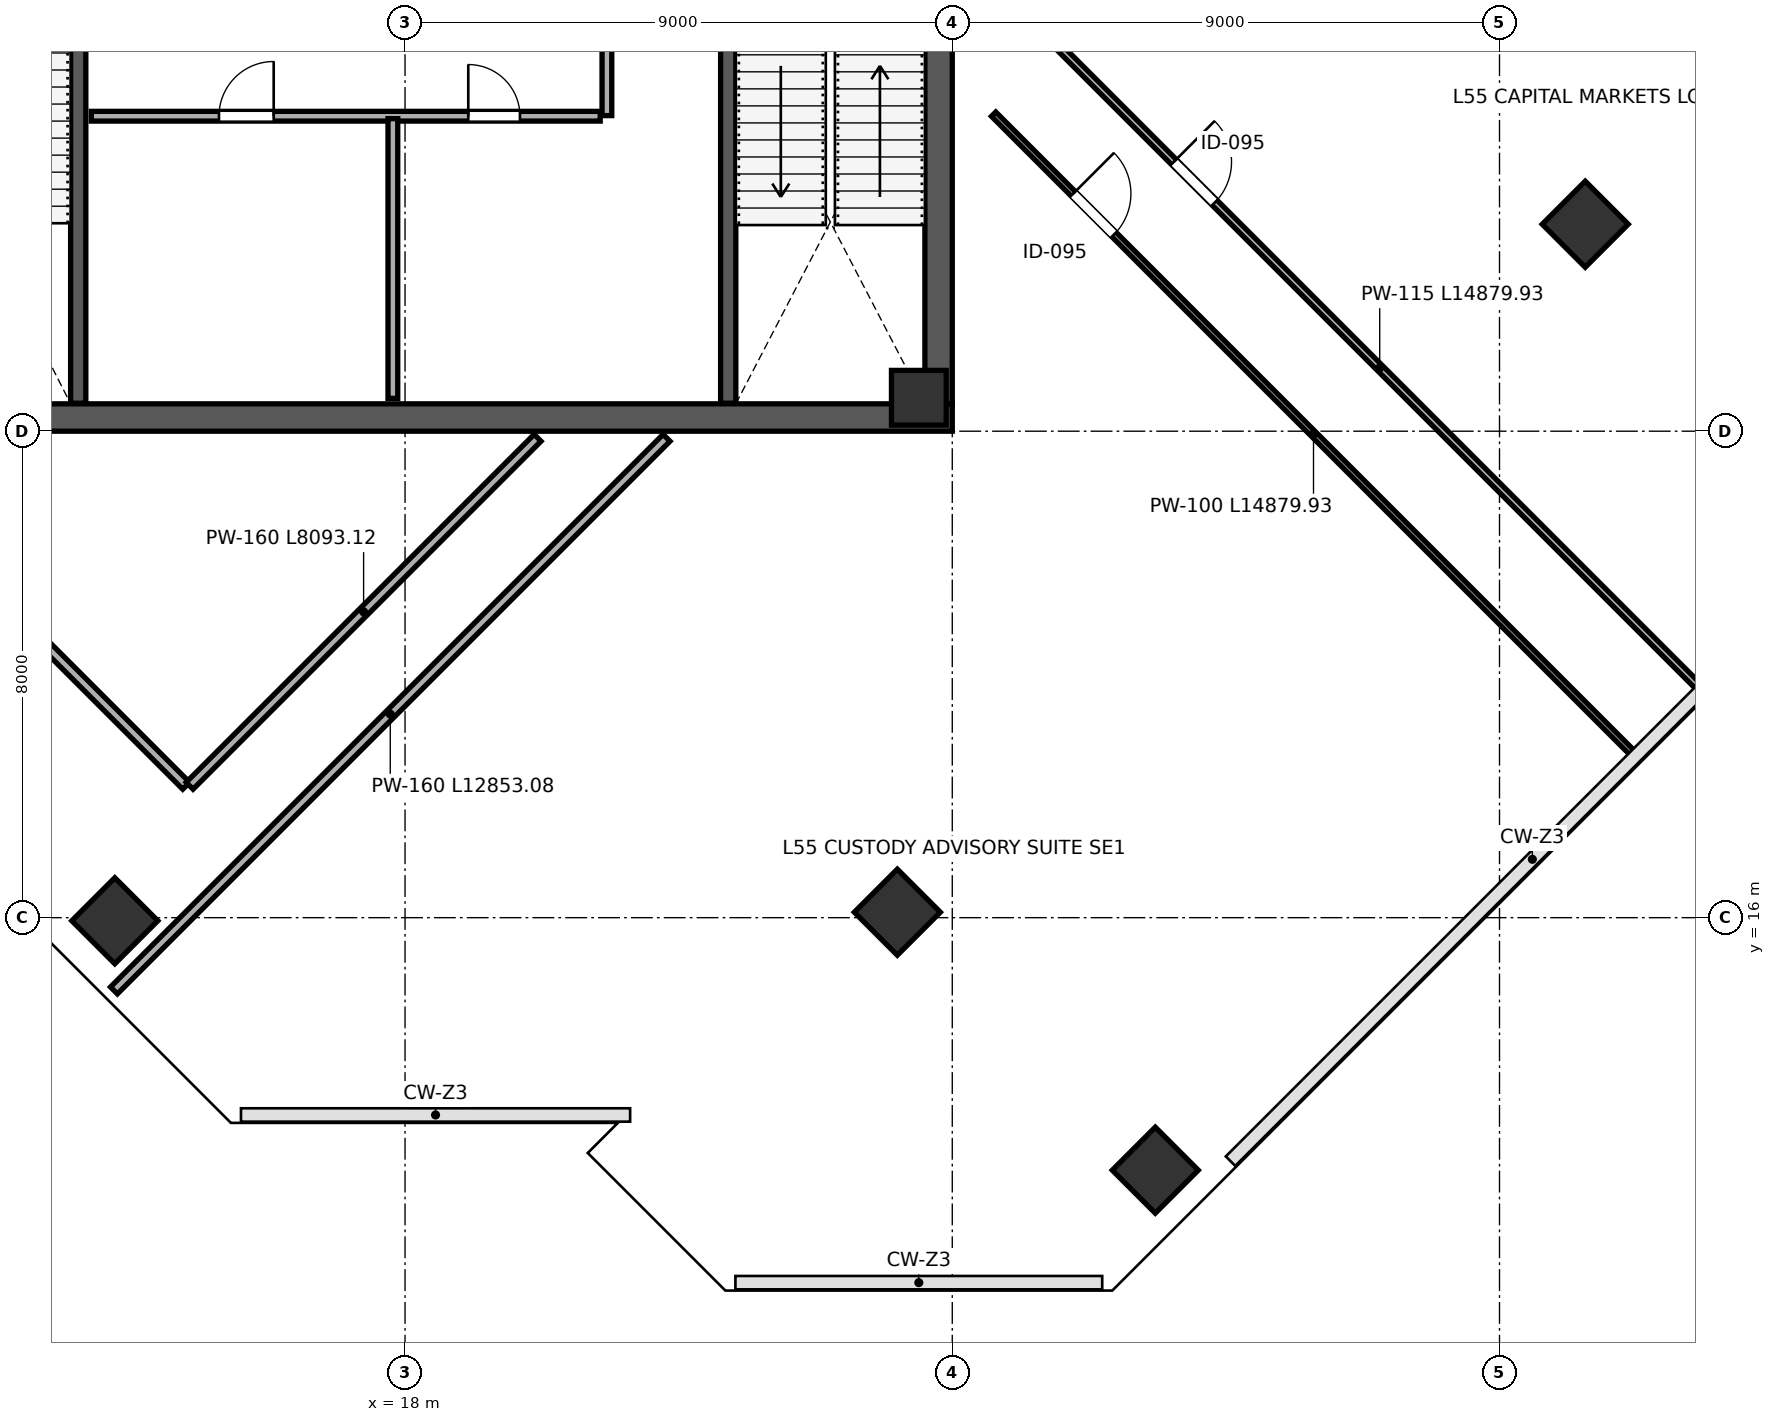
"""IFC4 building model, lengths in metres.
Left out: names, types, materials, properties, quantities, classifications, styles, units other than length and angle.
Written with IfcOpenShell. Run it as: python <this file> out.ifc"""

import sys

from ifc_helpers import new_model, si_unit, direction, frame, frame_2d, origin, origin_2d, place, context, subcontext, project, spatial, rectangle, extrude, source, transform, mapped, element, fill, save


model = new_model("IFC4")
c1 = context("Model", 3, precision=1e-05, world=origin(), true_north=direction((0.0, 1.0)))
c2 = subcontext(c1, "Body", "Model", "MODEL_VIEW")
j1 = project(units=[si_unit("LENGTHUNIT", "METRE"), si_unit("PLANEANGLEUNIT", "RADIAN")], contexts=[c1])
p1 = place(None, origin())
s1 = spatial("IfcSite", under=j1, at=p1, CompositionType="ELEMENT")
p2 = place(p1, origin())
s2 = spatial("IfcBuilding", under=s1, at=p2, CompositionType="ELEMENT")
p3 = place(p2, frame((0.0, 0.0, 245.8)))
s3 = spatial("IfcBuildingStorey", under=s2, at=p3, CompositionType="ELEMENT", Elevation=245.8)
m1 = source(origin(), c2, "Body", "SweptSolid", [
    extrude(rectangle(XDim=0.9, YDim=0.9, at=origin_2d()), origin(), (0.0, 0.0, 1.0), 4.198),
])
p4 = place(p3, frame((26.45, 24.55, 0.001), z_axis=(0.0, 0.0, 1.0), x_axis=(1.0, 0.0, 0.0)))
e1 = element("IfcColumn", 1, at=p4, inside=s3, PredefinedType="COLUMN", context=c2, shape_type="MappedRepresentation", body=[
    mapped(m1, transform((0.0, 0.0, 0.0), scale=1.0)),
])
m2 = source(origin(), c2, "Body", "SweptSolid", [
    extrude(rectangle(XDim=1.0, YDim=1.0, at=origin_2d()), origin(), (0.0, 0.0, 1.0), 4.198),
])
p5 = place(p3, frame((13.227, 15.949, 0.001), z_axis=(0.0, 0.0, 1.0), x_axis=(-0.707106781187, 0.707106781187, 0.0)))
e2 = element("IfcColumn", 2, at=p5, inside=s3, PredefinedType="COLUMN", context=c2, shape_type="MappedRepresentation", body=[
    mapped(m2, transform((0.0, 0.0, 0.0), scale=1.0)),
])
m3 = source(origin(), c2, "Body", "SweptSolid", [
    extrude(rectangle(XDim=1.0, YDim=1.0, at=origin_2d()), origin(), (0.0, 0.0, 1.0), 4.198),
])
for number, where, z_axis, x_axis in (
    (3, (26.096, 16.09, 0.001), (0.0, 0.0, 1.0), (-0.707, 0.707, 0.0)),
    (4, (37.41, 27.404, 0.001), (0.0, 0.0, 1.0), (-0.707, 0.707, 0.0)),
):
    element("IfcColumn", number, at=place(p3, frame(where, z_axis=z_axis, x_axis=x_axis)), inside=s3, PredefinedType="COLUMN", context=c2, shape_type="MappedRepresentation", body=[
        mapped(m3, transform((0.0, 0.0, 0.0), scale=1.0)),
    ])
p6 = place(p3, frame((30.339, 11.847, 0.001), z_axis=(0.0, 0.0, 1.0), x_axis=(-0.707106781187, 0.707106781187, 0.0)))
e5 = element("IfcColumn", 5, at=p6, inside=s3, PredefinedType="COLUMN", context=c2, shape_type="MappedRepresentation", body=[
    mapped(m2, transform((0.0, 0.0, 0.0), scale=1.0)),
])
p7 = place(p3, frame((26.775, 24.45, 0.0), z_axis=(0.0, 0.0, 1.0), x_axis=(0.0, 1.0, 0.0)))
e6 = element("IfcWall", 6, at=p7, inside=s3, PredefinedType="SHEAR", context=c2, shape_type="SweptSolid", body=[
    extrude(rectangle(XDim=15.1, YDim=0.45, at=frame_2d((7.55, 0.0))), origin(), (0.0, 0.0, 1.0), 3.96),
])
p8 = place(p7, frame((8.6, 0.0, 0.0)))
e7 = element("IfcOpeningElement", 7, at=p8, cuts=e6, PredefinedType="OPENING", context=c2, shape_type="SweptSolid", body=[
    extrude(rectangle(XDim=1.15, YDim=2.2, at=frame_2d((0.575, 1.1))), frame((0.0, 0.235, 0.0), z_axis=(0.0, -1.0, 0.0), x_axis=(1.0, 0.0, 0.0)), (0.0, 0.0, 1.0), 0.47),
])
p9 = place(p3, frame((9.0, 24.225, 0.0), z_axis=(0.0, 0.0, 1.0), x_axis=(1.0, 0.0, 0.0)))
e8 = element("IfcWall", 8, at=p9, inside=s3, PredefinedType="SHEAR", context=c2, shape_type="SweptSolid", body=[
    extrude(rectangle(XDim=18.0, YDim=0.45, at=frame_2d((9.0, 0.0))), origin(), (0.0, 0.0, 1.0), 3.96),
])
p10 = place(p3, frame((12.625, 24.46, 0.0), z_axis=(0.0, 0.0, 1.0), x_axis=(0.0, 1.0, 0.0)))
e9 = element("IfcWall", 9, at=p10, inside=s3, PredefinedType="SHEAR", context=c2, shape_type="SweptSolid", body=[
    extrude(rectangle(XDim=7.49, YDim=0.25, at=frame_2d((3.745, 0.0))), origin(), (0.0, 0.0, 1.0), 3.96),
])
p11 = place(p10, frame((5.85, 0.0, 0.0)))
e10 = element("IfcOpeningElement", 10, at=p11, cuts=e9, PredefinedType="OPENING", context=c2, shape_type="SweptSolid", body=[
    extrude(rectangle(XDim=1.15, YDim=2.2, at=frame_2d((0.575, 1.1))), frame((0.0, 0.135, 0.0), z_axis=(0.0, -1.0, 0.0), x_axis=(1.0, 0.0, 0.0)), (0.0, 0.0, 1.0), 0.27),
])
p12 = place(p3, frame((23.315, 24.46, 0.0), z_axis=(0.0, 0.0, 1.0), x_axis=(0.0, 1.0, 0.0)))
e11 = element("IfcWall", 11, at=p12, inside=s3, PredefinedType="SHEAR", context=c2, shape_type="SweptSolid", body=[
    extrude(rectangle(XDim=7.49, YDim=0.25, at=frame_2d((3.745, 0.0))), origin(), (0.0, 0.0, 1.0), 3.96),
])
p13 = place(p3, frame((12.84, 29.18, 0.0), z_axis=(0.0, 0.0, 1.0), x_axis=(1.0, 0.0, 0.0)))
e12 = element("IfcWall", 12, at=p13, inside=s3, PredefinedType="PARTITIONING", context=c2, shape_type="SweptSolid", body=[
    extrude(rectangle(XDim=8.37, YDim=0.16, at=frame_2d((4.185, 0.0))), origin(), (0.0, 0.0, 1.0), 3.96),
])
p14 = place(p13, frame((2.1, 0.0, 0.0)))
e13 = element("IfcOpeningElement", 13, at=p14, cuts=e12, PredefinedType="OPENING", context=c2, shape_type="SweptSolid", body=[
    extrude(rectangle(XDim=0.9, YDim=2.15, at=frame_2d((0.45, 1.075))), frame((0.0, 0.09, 0.0), z_axis=(0.0, -1.0, 0.0), x_axis=(1.0, 0.0, 0.0)), (0.0, 0.0, 1.0), 0.18),
])
p15 = place(p13, frame((6.2, 0.0, 0.0)))
e14 = element("IfcOpeningElement", 14, at=p15, cuts=e12, PredefinedType="OPENING", context=c2, shape_type="SweptSolid", body=[
    extrude(rectangle(XDim=0.85, YDim=2.1, at=frame_2d((0.425, 1.05))), frame((0.0, 0.09, 0.0), z_axis=(0.0, -1.0, 0.0), x_axis=(1.0, 0.0, 0.0)), (0.0, 0.0, 1.0), 0.18),
])
p16 = place(p3, frame((17.8, 24.54, 0.0), z_axis=(0.0, 0.0, 1.0), x_axis=(0.0, 1.0, 0.0)))
e15 = element("IfcWall", 15, at=p16, inside=s3, PredefinedType="PARTITIONING", context=c2, shape_type="SweptSolid", body=[
    extrude(rectangle(XDim=4.6, YDim=0.16, at=frame_2d((2.3, 0.0))), origin(), (0.0, 0.0, 1.0), 3.96),
])
p17 = place(p3, frame((21.32, 29.19, 0.0), z_axis=(0.0, 0.0, 1.0), x_axis=(0.0, 1.0, 0.0)))
e16 = element("IfcWall", 16, at=p17, inside=s3, PredefinedType="PARTITIONING", context=c2, shape_type="SweptSolid", body=[
    extrude(rectangle(XDim=2.92, YDim=0.16, at=frame_2d((1.46, 0.0))), origin(), (0.0, 0.0, 1.0), 3.96),
])
p18 = place(p3, frame((4.452, 28.118, 0.0), z_axis=(0.0, 0.0, 1.0), x_axis=(0.707106781187, -0.707106781187, 0.0)))
e17 = element("IfcWall", 17, at=p18, inside=s3, PredefinedType="PARTITIONING", context=c2, shape_type="SweptSolid", body=[
    extrude(rectangle(XDim=14.07, YDim=0.16, at=frame_2d((7.035, 0.0))), origin(), (0.0, 0.0, 1.0), 3.96),
])
p19 = place(p18, frame((1.15, 0.0, 0.0)))
e18 = element("IfcOpeningElement", 18, at=p19, cuts=e17, PredefinedType="OPENING", context=c2, shape_type="SweptSolid", body=[
    extrude(rectangle(XDim=0.95, YDim=2.15, at=frame_2d((0.475, 1.075))), frame((0.0, 0.09, 0.0), z_axis=(0.0, -1.0, 0.0), x_axis=(1.0, 0.0, 0.0)), (0.0, 0.0, 1.0), 0.18),
])
p20 = place(p3, frame((14.457, 18.169, 0.0), z_axis=(0.0, 0.0, 1.0), x_axis=(0.707106781187, 0.707106781187, 0.0)))
e19 = element("IfcWall", 19, at=p20, inside=s3, PredefinedType="PARTITIONING", context=c2, shape_type="SweptSolid", body=[
    extrude(rectangle(XDim=8.093, YDim=0.16, at=frame_2d((4.046, 0.0))), origin(), (0.0, 0.0, 1.0), 3.96),
])
p21 = place(p3, frame((13.213, 14.803, 0.0), z_axis=(0.0, 0.0, 1.0), x_axis=(0.707116278481, 0.707097283765, 0.0)))
e20 = element("IfcWall", 20, at=p21, inside=s3, PredefinedType="PARTITIONING", context=c2, shape_type="SweptSolid", body=[
    extrude(rectangle(XDim=12.853, YDim=0.16, at=frame_2d((6.427, 0.0))), origin(), (0.0, 0.0, 1.0), 3.96),
])
p22 = place(p3, frame((28.769, 30.303, 0.0), z_axis=(0.0, 0.0, 1.0), x_axis=(0.707106781187, -0.707106781187, 0.0)))
e21 = element("IfcWall", 21, at=p22, inside=s3, PredefinedType="PARTITIONING", context=c2, shape_type="SweptSolid", body=[
    extrude(rectangle(XDim=14.88, YDim=0.115, at=frame_2d((7.44, 0.0))), origin(), (0.0, 0.0, 1.0), 3.96),
])
p23 = place(p22, frame((2.65, 0.0, 0.0)))
e22 = element("IfcOpeningElement", 22, at=p23, cuts=e21, PredefinedType="OPENING", context=c2, shape_type="SweptSolid", body=[
    extrude(rectangle(XDim=0.95, YDim=2.15, at=frame_2d((0.475, 1.075))), frame((0.0, 0.067, 0.0), z_axis=(0.0, -1.0, 0.0), x_axis=(1.0, 0.0, 0.0)), (0.0, 0.0, 1.0), 0.135),
])
p24 = place(p3, frame((27.68, 29.214, 0.0), z_axis=(0.0, 0.0, 1.0), x_axis=(0.707106781187, -0.707106781187, 0.0)))
e23 = element("IfcWall", 23, at=p24, inside=s3, PredefinedType="PARTITIONING", context=c2, shape_type="SweptSolid", body=[
    extrude(rectangle(XDim=14.88, YDim=0.1, at=frame_2d((7.44, 0.0))), origin(), (0.0, 0.0, 1.0), 3.96),
])
p25 = place(p24, frame((1.85, 0.0, 0.0)))
e24 = element("IfcOpeningElement", 24, at=p25, cuts=e23, PredefinedType="OPENING", context=c2, shape_type="SweptSolid", body=[
    extrude(rectangle(XDim=0.95, YDim=2.15, at=frame_2d((0.475, 1.075))), frame((0.0, 0.06, 0.0), z_axis=(0.0, -1.0, 0.0), x_axis=(1.0, 0.0, 0.0)), (0.0, 0.0, 1.0), 0.12),
])
m4 = source(origin(), c2, "Body", "SweptSolid", [
    extrude(rectangle(XDim=0.9, YDim=2.15, at=frame_2d((0.45, 1.075))), frame((0.0, 0.025, 0.0), z_axis=(0.0, -1.0, 0.0), x_axis=(1.0, 0.0, 0.0)), (0.0, 0.0, 1.0), 0.05),
])
p26 = place(p14, origin())
e25 = element("IfcDoor", 25, at=p26, inside=s3, OperationType="SINGLE_SWING_RIGHT", PredefinedType="DOOR", context=c2, shape_type="MappedRepresentation", body=[
    mapped(m4, transform((0.0, 0.0, 0.0), scale=1.0)),
])
fill(e13, e25)
m5 = source(origin(), c2, "Body", "SweptSolid", [
    extrude(rectangle(XDim=0.85, YDim=2.1, at=frame_2d((0.425, 1.05))), frame((0.0, 0.025, 0.0), z_axis=(0.0, -1.0, 0.0), x_axis=(1.0, 0.0, 0.0)), (0.0, 0.0, 1.0), 0.05),
])
p27 = place(p15, origin())
e26 = element("IfcDoor", 26, at=p27, inside=s3, OperationType="SINGLE_SWING_LEFT", PredefinedType="DOOR", context=c2, shape_type="MappedRepresentation", body=[
    mapped(m5, transform((0.0, 0.0, 0.0), scale=1.0)),
])
fill(e14, e26)
m6 = source(origin(), c2, "Body", "SweptSolid", [
    extrude(rectangle(XDim=0.95, YDim=2.15, at=frame_2d((0.475, 1.075))), frame((0.0, 0.025, 0.0), z_axis=(0.0, -1.0, 0.0), x_axis=(1.0, 0.0, 0.0)), (0.0, 0.0, 1.0), 0.05),
])
p28 = place(p23, origin())
e27 = element("IfcDoor", 27, at=p28, inside=s3, OperationType="SINGLE_SWING_LEFT", PredefinedType="DOOR", context=c2, shape_type="MappedRepresentation", body=[
    mapped(m6, transform((0.0, 0.0, 0.0), scale=1.0)),
])
fill(e22, e27)
p29 = place(p25, origin())
e28 = element("IfcDoor", 28, at=p29, inside=s3, OperationType="SINGLE_SWING_LEFT", PredefinedType="DOOR", context=c2, shape_type="MappedRepresentation", body=[
    mapped(m6, transform((0.0, 0.0, 0.0), scale=1.0)),
])
fill(e24, e28)
save(model, sys.argv[1])
